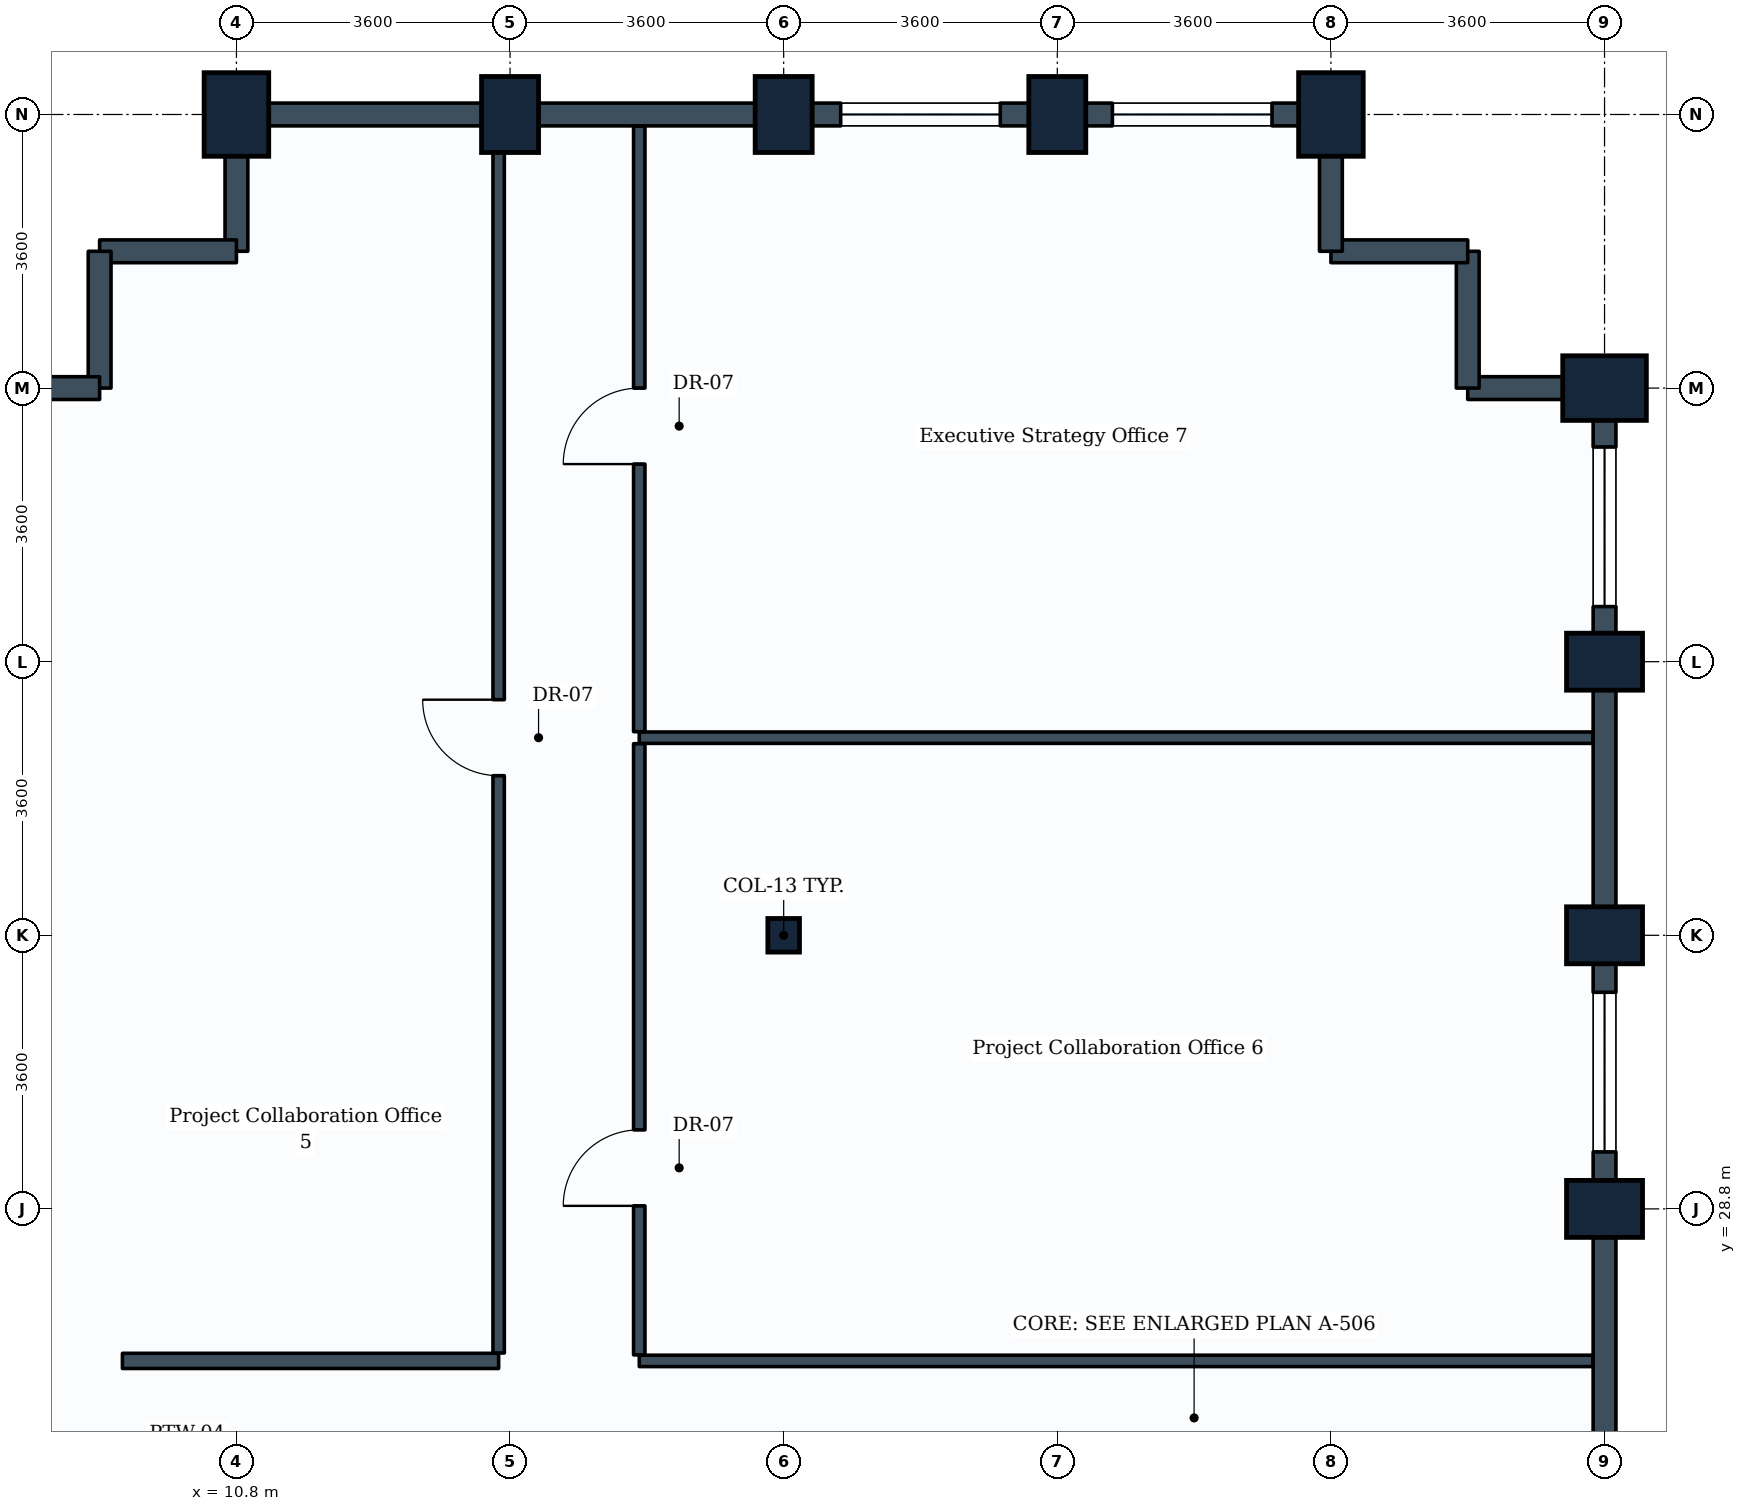
"""IFC4 building model, lengths in metres.
Left out: names, types, materials, properties, quantities, classifications, styles, units other than length and angle.
Written with IfcOpenShell. Run it as: python <this file> out.ifc"""

import sys

from ifc_helpers import new_model, si_unit, direction, frame, frame_2d, origin, origin_2d, place, context, subcontext, project, spatial, rectangle, i_section, extrude, element, fill, save


model = new_model("IFC4")
c1 = context("Model", 3, precision=1e-05, world=origin(), true_north=direction((0.0, 1.0)))
c2 = subcontext(c1, "Body", "Model", "MODEL_VIEW")
j1 = project(units=[si_unit("LENGTHUNIT", "METRE"), si_unit("PLANEANGLEUNIT", "RADIAN")], contexts=[c1])
p1 = place(None, origin())
s1 = spatial("IfcSite", under=j1, at=p1, CompositionType="ELEMENT")
p2 = place(p1, origin())
s2 = spatial("IfcBuilding", under=s1, at=p2, CompositionType="ELEMENT")
p3 = place(p2, frame((0.0, 0.0, 161.8)))
s3 = spatial("IfcBuildingStorey", under=s2, at=p3, CompositionType="ELEMENT", Elevation=161.8)
p4 = place(p3, frame((10.8, 43.2, 0.0), z_axis=(0.0, 0.0, 1.0), x_axis=(1.0, 0.0, 0.0)))
e1 = element("IfcColumn", 1, at=p4, inside=s3, PredefinedType="COLUMN", context=c2, shape_type="SweptSolid", body=[
    extrude(rectangle(XDim=0.85, YDim=1.1, at=origin_2d()), origin(), (0.0, 0.0, 1.0), 3.8),
])
p5 = place(p3, frame((14.4, 43.2, 0.0), z_axis=(0.0, 0.0, 1.0), x_axis=(1.0, 0.0, 0.0)))
e2 = element("IfcColumn", 2, at=p5, inside=s3, PredefinedType="COLUMN", context=c2, shape_type="SweptSolid", body=[
    extrude(rectangle(XDim=0.75, YDim=1.0, at=origin_2d()), origin(), (0.0, 0.0, 1.0), 3.8),
])
p6 = place(p3, frame((18.0, 32.4, 0.0), z_axis=(0.0, 0.0, 1.0), x_axis=(1.0, 0.0, 0.0)))
e3 = element("IfcColumn", 3, at=p6, inside=s3, PredefinedType="COLUMN", context=c2, shape_type="SweptSolid", body=[
    extrude(i_section(OverallWidth=0.416, OverallDepth=0.442, WebThickness=0.025, FlangeThickness=0.041, FilletRadius=0.015, at=origin_2d()), origin(), (0.0, 0.0, 1.0), 3.8),
])
for number, where, z_axis, x_axis in (
    (4, (18.0, 43.2, 0.0), (0.0, 0.0, 1.0), (1.0, 0.0, 0.0)),
    (5, (21.6, 43.2, 0.0), (0.0, 0.0, 1.0), (1.0, 0.0, 0.0)),
):
    element("IfcColumn", number, at=place(p3, frame(where, z_axis=z_axis, x_axis=x_axis)), inside=s3, PredefinedType="COLUMN", context=c2, shape_type="SweptSolid", body=[
        extrude(rectangle(XDim=0.75, YDim=1.0, at=origin_2d()), origin(), (0.0, 0.0, 1.0), 3.8),
    ])
p7 = place(p3, frame((25.2, 43.2, 0.0), z_axis=(0.0, 0.0, 1.0), x_axis=(1.0, 0.0, 0.0)))
e6 = element("IfcColumn", 6, at=p7, inside=s3, PredefinedType="COLUMN", context=c2, shape_type="SweptSolid", body=[
    extrude(rectangle(XDim=0.85, YDim=1.1, at=origin_2d()), origin(), (0.0, 0.0, 1.0), 3.8),
])
for number, where, z_axis, x_axis in (
    (7, (28.8, 28.8, 0.0), (0.0, 0.0, 1.0), (0.0, 1.0, 0.0)),
    (8, (28.8, 32.4, 0.0), (0.0, 0.0, 1.0), (0.0, 1.0, 0.0)),
    (9, (28.8, 36.0, 0.0), (0.0, 0.0, 1.0), (0.0, 1.0, 0.0)),
):
    element("IfcColumn", number, at=place(p3, frame(where, z_axis=z_axis, x_axis=x_axis)), inside=s3, PredefinedType="COLUMN", context=c2, shape_type="SweptSolid", body=[
        extrude(rectangle(XDim=0.75, YDim=1.0, at=origin_2d()), origin(), (0.0, 0.0, 1.0), 3.8),
    ])
p8 = place(p3, frame((28.8, 39.6, 0.0), z_axis=(0.0, 0.0, 1.0), x_axis=(0.0, 1.0, 0.0)))
e10 = element("IfcColumn", 10, at=p8, inside=s3, PredefinedType="COLUMN", context=c2, shape_type="SweptSolid", body=[
    extrude(rectangle(XDim=0.85, YDim=1.1, at=origin_2d()), origin(), (0.0, 0.0, 1.0), 3.8),
])
p9 = place(p3, frame((28.8, 28.8, 0.0), z_axis=(0.0, 0.0, 1.0), x_axis=(0.0, -1.0, 0.0)))
e11 = element("IfcWall", 11, at=p9, inside=s3, PredefinedType="STANDARD", context=c2, shape_type="SweptSolid", body=[
    extrude(rectangle(XDim=3.6, YDim=0.3, at=frame_2d((1.8, 0.0))), origin(), (0.0, 0.0, 1.0), 3.17),
])
p10 = place(p3, frame((28.8, 32.4, 0.0), z_axis=(0.0, 0.0, 1.0), x_axis=(0.0, -1.0, 0.0)))
e12 = element("IfcWall", 12, at=p10, inside=s3, PredefinedType="STANDARD", context=c2, shape_type="SweptSolid", body=[
    extrude(rectangle(XDim=3.6, YDim=0.3, at=frame_2d((1.8, 0.0))), origin(), (0.0, 0.0, 1.0), 2.93),
])
p11 = place(p10, frame((0.75, 0.0, 0.85)))
e13 = element("IfcOpeningElement", 13, at=p11, cuts=e12, PredefinedType="OPENING", context=c2, shape_type="SweptSolid", body=[
    extrude(rectangle(XDim=2.1, YDim=1.35, at=frame_2d((1.05, 0.675))), frame((0.0, 0.16, 0.0), z_axis=(0.0, -1.0, 0.0), x_axis=(1.0, 0.0, 0.0)), (0.0, 0.0, 1.0), 0.32),
])
p12 = place(p3, frame((28.8, 36.0, 0.0), z_axis=(0.0, 0.0, 1.0), x_axis=(0.0, -1.0, 0.0)))
e14 = element("IfcWall", 14, at=p12, inside=s3, PredefinedType="STANDARD", context=c2, shape_type="SweptSolid", body=[
    extrude(rectangle(XDim=3.6, YDim=0.3, at=frame_2d((1.8, 0.0))), origin(), (0.0, 0.0, 1.0), 2.93),
])
p13 = place(p3, frame((28.8, 39.6, 0.0), z_axis=(0.0, 0.0, 1.0), x_axis=(0.0, -1.0, 0.0)))
e15 = element("IfcWall", 15, at=p13, inside=s3, PredefinedType="STANDARD", context=c2, shape_type="SweptSolid", body=[
    extrude(rectangle(XDim=3.6, YDim=0.3, at=frame_2d((1.8, 0.0))), origin(), (0.0, 0.0, 1.0), 2.93),
])
p14 = place(p13, frame((0.775, 0.0, 0.85)))
e16 = element("IfcOpeningElement", 16, at=p14, cuts=e15, PredefinedType="OPENING", context=c2, shape_type="SweptSolid", body=[
    extrude(rectangle(XDim=2.1, YDim=1.35, at=frame_2d((1.05, 0.675))), frame((0.0, 0.16, 0.0), z_axis=(0.0, -1.0, 0.0), x_axis=(1.0, 0.0, 0.0)), (0.0, 0.0, 1.0), 0.32),
])
p15 = place(p3, frame((27.0, 39.6, 0.0), z_axis=(0.0, 0.0, 1.0), x_axis=(1.0, 0.0, 0.0)))
e17 = element("IfcWall", 17, at=p15, inside=s3, PredefinedType="STANDARD", context=c2, shape_type="SweptSolid", body=[
    extrude(rectangle(XDim=1.8, YDim=0.3, at=frame_2d((0.9, 0.0))), origin(), (0.0, 0.0, 1.0), 2.93),
])
p16 = place(p3, frame((27.0, 39.6, 0.0), z_axis=(0.0, 0.0, 1.0), x_axis=(0.0, 1.0, 0.0)))
e18 = element("IfcWall", 18, at=p16, inside=s3, PredefinedType="STANDARD", context=c2, shape_type="SweptSolid", body=[
    extrude(rectangle(XDim=1.8, YDim=0.3, at=frame_2d((0.9, 0.0))), origin(), (0.0, 0.0, 1.0), 3.535),
])
p17 = place(p3, frame((25.2, 41.4, 0.0), z_axis=(0.0, 0.0, 1.0), x_axis=(1.0, 0.0, 0.0)))
e19 = element("IfcWall", 19, at=p17, inside=s3, PredefinedType="STANDARD", context=c2, shape_type="SweptSolid", body=[
    extrude(rectangle(XDim=1.8, YDim=0.3, at=frame_2d((0.9, 0.0))), origin(), (0.0, 0.0, 1.0), 3.535),
])
p18 = place(p3, frame((25.2, 41.4, 0.0), z_axis=(0.0, 0.0, 1.0), x_axis=(0.0, 1.0, 0.0)))
e20 = element("IfcWall", 20, at=p18, inside=s3, PredefinedType="STANDARD", context=c2, shape_type="SweptSolid", body=[
    extrude(rectangle(XDim=1.8, YDim=0.3, at=frame_2d((0.9, 0.0))), origin(), (0.0, 0.0, 1.0), 2.93),
])
p19 = place(p3, frame((21.6, 43.2, 0.0), z_axis=(0.0, 0.0, 1.0), x_axis=(1.0, 0.0, 0.0)))
e21 = element("IfcWall", 21, at=p19, inside=s3, PredefinedType="STANDARD", context=c2, shape_type="SweptSolid", body=[
    extrude(rectangle(XDim=3.6, YDim=0.3, at=frame_2d((1.8, 0.0))), origin(), (0.0, 0.0, 1.0), 2.93),
])
p20 = place(p19, frame((0.725, 0.0, 0.85)))
e22 = element("IfcOpeningElement", 22, at=p20, cuts=e21, PredefinedType="OPENING", context=c2, shape_type="SweptSolid", body=[
    extrude(rectangle(XDim=2.1, YDim=1.35, at=frame_2d((1.05, 0.675))), frame((0.0, 0.16, 0.0), z_axis=(0.0, -1.0, 0.0), x_axis=(1.0, 0.0, 0.0)), (0.0, 0.0, 1.0), 0.32),
])
p21 = place(p3, frame((18.0, 43.2, 0.0), z_axis=(0.0, 0.0, 1.0), x_axis=(1.0, 0.0, 0.0)))
e23 = element("IfcWall", 23, at=p21, inside=s3, PredefinedType="STANDARD", context=c2, shape_type="SweptSolid", body=[
    extrude(rectangle(XDim=3.6, YDim=0.3, at=frame_2d((1.8, 0.0))), origin(), (0.0, 0.0, 1.0), 2.93),
])
p22 = place(p21, frame((0.75, 0.0, 0.85)))
e24 = element("IfcOpeningElement", 24, at=p22, cuts=e23, PredefinedType="OPENING", context=c2, shape_type="SweptSolid", body=[
    extrude(rectangle(XDim=2.1, YDim=1.35, at=frame_2d((1.05, 0.675))), frame((0.0, 0.16, 0.0), z_axis=(0.0, -1.0, 0.0), x_axis=(1.0, 0.0, 0.0)), (0.0, 0.0, 1.0), 0.32),
])
p23 = place(p3, frame((14.4, 43.2, 0.0), z_axis=(0.0, 0.0, 1.0), x_axis=(1.0, 0.0, 0.0)))
e25 = element("IfcWall", 25, at=p23, inside=s3, PredefinedType="STANDARD", context=c2, shape_type="SweptSolid", body=[
    extrude(rectangle(XDim=3.6, YDim=0.3, at=frame_2d((1.8, 0.0))), origin(), (0.0, 0.0, 1.0), 2.93),
])
p24 = place(p3, frame((10.8, 43.2, 0.0), z_axis=(0.0, 0.0, 1.0), x_axis=(1.0, 0.0, 0.0)))
e26 = element("IfcWall", 26, at=p24, inside=s3, PredefinedType="STANDARD", context=c2, shape_type="SweptSolid", body=[
    extrude(rectangle(XDim=3.6, YDim=0.3, at=frame_2d((1.8, 0.0))), origin(), (0.0, 0.0, 1.0), 2.93),
])
p25 = place(p3, frame((10.8, 41.4, 0.0), z_axis=(0.0, 0.0, 1.0), x_axis=(0.0, 1.0, 0.0)))
e27 = element("IfcWall", 27, at=p25, inside=s3, PredefinedType="STANDARD", context=c2, shape_type="SweptSolid", body=[
    extrude(rectangle(XDim=1.8, YDim=0.3, at=frame_2d((0.9, 0.0))), origin(), (0.0, 0.0, 1.0), 2.93),
])
p26 = place(p3, frame((9.0, 41.4, 0.0), z_axis=(0.0, 0.0, 1.0), x_axis=(1.0, 0.0, 0.0)))
e28 = element("IfcWall", 28, at=p26, inside=s3, PredefinedType="STANDARD", context=c2, shape_type="SweptSolid", body=[
    extrude(rectangle(XDim=1.8, YDim=0.3, at=frame_2d((0.9, 0.0))), origin(), (0.0, 0.0, 1.0), 3.535),
])
p27 = place(p3, frame((9.0, 39.6, 0.0), z_axis=(0.0, 0.0, 1.0), x_axis=(0.0, 1.0, 0.0)))
e29 = element("IfcWall", 29, at=p27, inside=s3, PredefinedType="STANDARD", context=c2, shape_type="SweptSolid", body=[
    extrude(rectangle(XDim=1.8, YDim=0.3, at=frame_2d((0.9, 0.0))), origin(), (0.0, 0.0, 1.0), 3.535),
])
p28 = place(p3, frame((7.2, 39.6, 0.0), z_axis=(0.0, 0.0, 1.0), x_axis=(1.0, 0.0, 0.0)))
e30 = element("IfcWall", 30, at=p28, inside=s3, PredefinedType="STANDARD", context=c2, shape_type="SweptSolid", body=[
    extrude(rectangle(XDim=1.8, YDim=0.3, at=frame_2d((0.9, 0.0))), origin(), (0.0, 0.0, 1.0), 2.93),
])
p29 = place(p3, frame((9.3, 26.8, 0.0), z_axis=(0.0, 0.0, 1.0), x_axis=(1.0, 0.0, 0.0)))
e31 = element("IfcWall", 31, at=p29, inside=s3, PredefinedType="PARTITIONING", context=c2, shape_type="SweptSolid", body=[
    extrude(rectangle(XDim=4.95, YDim=0.2, at=frame_2d((2.475, 0.0))), origin(), (0.0, 0.0, 1.0), 3.535),
])
p30 = place(p3, frame((14.25, 26.904, 0.0), z_axis=(0.0, 0.0, 1.0), x_axis=(0.0, 1.0, 0.0)))
e32 = element("IfcWall", 32, at=p30, inside=s3, PredefinedType="PARTITIONING", context=c2, shape_type="SweptSolid", body=[
    extrude(rectangle(XDim=16.142, YDim=0.15, at=frame_2d((8.071, 0.0))), origin(), (0.0, 0.0, 1.0), 2.93),
])
p31 = place(p30, frame((7.596, 0.0, 0.0)))
e33 = element("IfcOpeningElement", 33, at=p31, cuts=e32, PredefinedType="OPENING", context=c2, shape_type="SweptSolid", body=[
    extrude(rectangle(XDim=1.0, YDim=2.1, at=frame_2d((0.5, 1.05))), frame((0.0, 0.085, 0.0), z_axis=(0.0, -1.0, 0.0), x_axis=(1.0, 0.0, 0.0)), (0.0, 0.0, 1.0), 0.17),
])
p32 = place(p3, frame((16.1, 26.8, 0.0), z_axis=(0.0, 0.0, 1.0), x_axis=(1.0, 0.0, 0.0)))
e34 = element("IfcWall", 34, at=p32, inside=s3, PredefinedType="PARTITIONING", context=c2, shape_type="SweptSolid", body=[
    extrude(rectangle(XDim=12.546, YDim=0.15, at=frame_2d((6.273, 0.0))), origin(), (0.0, 0.0, 1.0), 3.17),
])
p33 = place(p3, frame((16.1, 35.0, 0.0), z_axis=(0.0, 0.0, 1.0), x_axis=(1.0, 0.0, 0.0)))
e35 = element("IfcWall", 35, at=p33, inside=s3, PredefinedType="PARTITIONING", context=c2, shape_type="SweptSolid", body=[
    extrude(rectangle(XDim=12.546, YDim=0.15, at=frame_2d((6.273, 0.0))), origin(), (0.0, 0.0, 1.0), 2.93),
])
p34 = place(p3, frame((16.1, 26.879, 0.0), z_axis=(0.0, 0.0, 1.0), x_axis=(0.0, 1.0, 0.0)))
e36 = element("IfcWall", 36, at=p34, inside=s3, PredefinedType="PARTITIONING", context=c2, shape_type="SweptSolid", body=[
    extrude(rectangle(XDim=8.042, YDim=0.15, at=frame_2d((4.021, 0.0))), origin(), (0.0, 0.0, 1.0), 3.17),
])
p35 = place(p34, frame((1.961, 0.0, 0.0)))
e37 = element("IfcOpeningElement", 37, at=p35, cuts=e36, PredefinedType="OPENING", context=c2, shape_type="SweptSolid", body=[
    extrude(rectangle(XDim=1.0, YDim=2.1, at=frame_2d((0.5, 1.05))), frame((0.0, 0.085, 0.0), z_axis=(0.0, -1.0, 0.0), x_axis=(1.0, 0.0, 0.0)), (0.0, 0.0, 1.0), 0.17),
])
p36 = place(p3, frame((16.1, 35.079, 0.0), z_axis=(0.0, 0.0, 1.0), x_axis=(0.0, 1.0, 0.0)))
e38 = element("IfcWall", 38, at=p36, inside=s3, PredefinedType="PARTITIONING", context=c2, shape_type="SweptSolid", body=[
    extrude(rectangle(XDim=7.967, YDim=0.15, at=frame_2d((3.983, 0.0))), origin(), (0.0, 0.0, 1.0), 2.93),
])
p37 = place(p36, frame((3.521, 0.0, 0.0)))
e39 = element("IfcOpeningElement", 39, at=p37, cuts=e38, PredefinedType="OPENING", context=c2, shape_type="SweptSolid", body=[
    extrude(rectangle(XDim=1.0, YDim=2.1, at=frame_2d((0.5, 1.05))), frame((0.0, 0.085, 0.0), z_axis=(0.0, -1.0, 0.0), x_axis=(1.0, 0.0, 0.0)), (0.0, 0.0, 1.0), 0.17),
])
p38 = place(p11, origin())
e40 = element("IfcWindow", 40, at=p38, inside=s3, PartitioningType="SINGLE_PANEL", PredefinedType="WINDOW", context=c2, shape_type="SweptSolid", body=[
    extrude(rectangle(XDim=2.1, YDim=1.35, at=frame_2d((1.05, 0.675))), frame((0.0, 0.03, 0.0), z_axis=(0.0, -1.0, 0.0), x_axis=(1.0, 0.0, 0.0)), (0.0, 0.0, 1.0), 0.06),
])
fill(e13, e40)
p39 = place(p14, origin())
e41 = element("IfcWindow", 41, at=p39, inside=s3, PartitioningType="SINGLE_PANEL", PredefinedType="WINDOW", context=c2, shape_type="SweptSolid", body=[
    extrude(rectangle(XDim=2.1, YDim=1.35, at=frame_2d((1.05, 0.675))), frame((0.0, 0.03, 0.0), z_axis=(0.0, -1.0, 0.0), x_axis=(1.0, 0.0, 0.0)), (0.0, 0.0, 1.0), 0.06),
])
fill(e16, e41)
p40 = place(p20, origin())
e42 = element("IfcWindow", 42, at=p40, inside=s3, PartitioningType="SINGLE_PANEL", PredefinedType="WINDOW", context=c2, shape_type="SweptSolid", body=[
    extrude(rectangle(XDim=2.1, YDim=1.35, at=frame_2d((1.05, 0.675))), frame((0.0, 0.03, 0.0), z_axis=(0.0, -1.0, 0.0), x_axis=(1.0, 0.0, 0.0)), (0.0, 0.0, 1.0), 0.06),
])
fill(e22, e42)
p41 = place(p22, origin())
e43 = element("IfcWindow", 43, at=p41, inside=s3, PartitioningType="SINGLE_PANEL", PredefinedType="WINDOW", context=c2, shape_type="SweptSolid", body=[
    extrude(rectangle(XDim=2.1, YDim=1.35, at=frame_2d((1.05, 0.675))), frame((0.0, 0.03, 0.0), z_axis=(0.0, -1.0, 0.0), x_axis=(1.0, 0.0, 0.0)), (0.0, 0.0, 1.0), 0.06),
])
fill(e24, e43)
p42 = place(p31, origin())
e44 = element("IfcDoor", 44, at=p42, inside=s3, OperationType="SINGLE_SWING_RIGHT", PredefinedType="DOOR", context=c2, shape_type="SweptSolid", body=[
    extrude(rectangle(XDim=1.0, YDim=2.1, at=frame_2d((0.5, 1.05))), frame((0.0, 0.025, 0.0), z_axis=(0.0, -1.0, 0.0), x_axis=(1.0, 0.0, 0.0)), (0.0, 0.0, 1.0), 0.05),
])
fill(e33, e44)
p43 = place(p35, origin())
e45 = element("IfcDoor", 45, at=p43, inside=s3, OperationType="SINGLE_SWING_LEFT", PredefinedType="DOOR", context=c2, shape_type="SweptSolid", body=[
    extrude(rectangle(XDim=1.0, YDim=2.1, at=frame_2d((0.5, 1.05))), frame((0.0, 0.025, 0.0), z_axis=(0.0, -1.0, 0.0), x_axis=(1.0, 0.0, 0.0)), (0.0, 0.0, 1.0), 0.05),
])
fill(e37, e45)
p44 = place(p37, origin())
e46 = element("IfcDoor", 46, at=p44, inside=s3, OperationType="SINGLE_SWING_LEFT", PredefinedType="DOOR", context=c2, shape_type="SweptSolid", body=[
    extrude(rectangle(XDim=1.0, YDim=2.1, at=frame_2d((0.5, 1.05))), frame((0.0, 0.025, 0.0), z_axis=(0.0, -1.0, 0.0), x_axis=(1.0, 0.0, 0.0)), (0.0, 0.0, 1.0), 0.05),
])
fill(e39, e46)
save(model, sys.argv[1])
